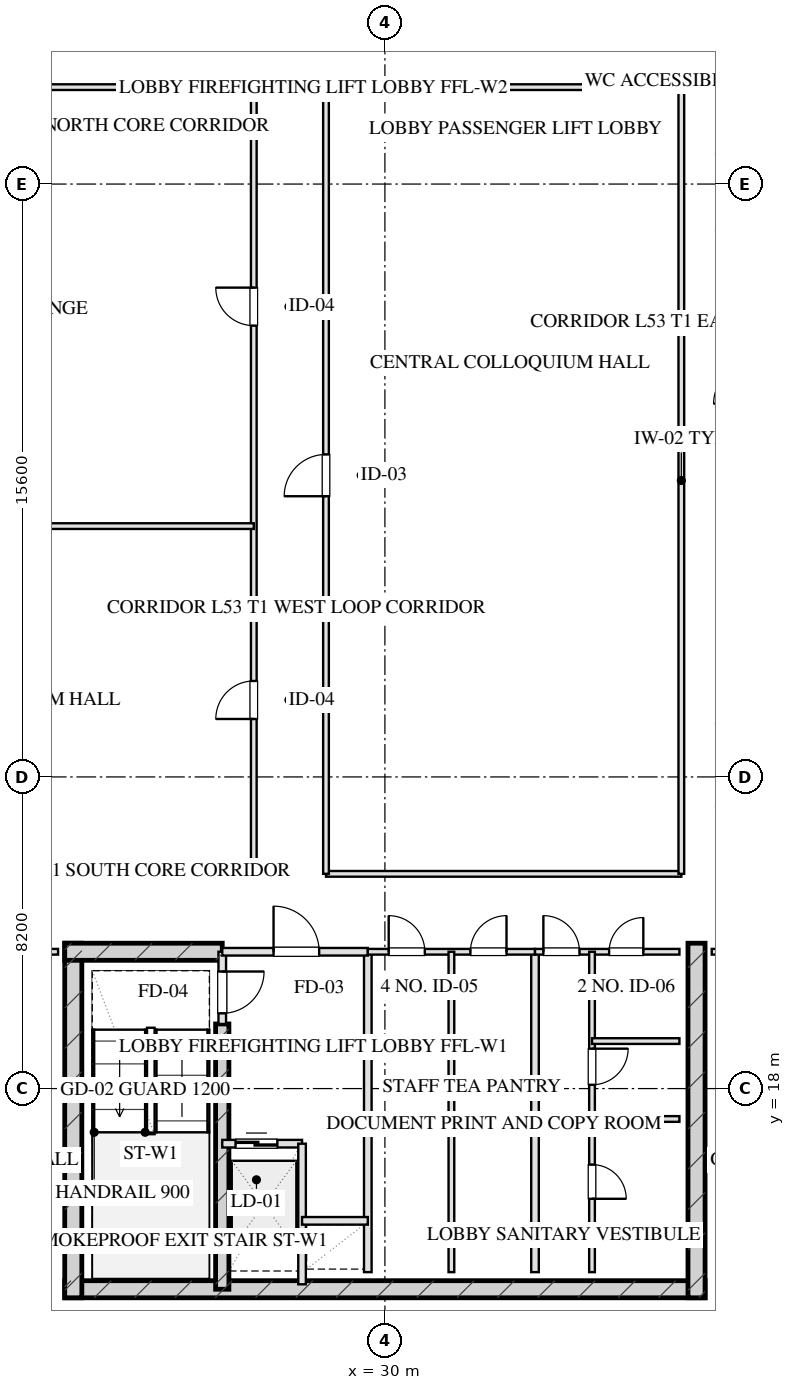
"""IFC4 building model, lengths in metres.
Left out: names, types, materials, properties, quantities, classifications, styles, units other than length and angle.
Written with IfcOpenShell. Run it as: python <this file> out.ifc"""

import sys

from ifc_helpers import new_model, si_unit, direction, frame, frame_2d, origin, place, context, subcontext, project, spatial, rectangle, extrude, element, fill, save


model = new_model("IFC4")
c1 = context("Model", 3, precision=1e-05, world=origin(), true_north=direction((0.0, 1.0)))
c2 = subcontext(c1, "Body", "Model", "MODEL_VIEW")
j1 = project(units=[si_unit("LENGTHUNIT", "METRE"), si_unit("PLANEANGLEUNIT", "RADIAN")], contexts=[c1])
p1 = place(None, origin())
s1 = spatial("IfcSite", under=j1, at=p1, CompositionType="ELEMENT")
p2 = place(p1, origin())
s2 = spatial("IfcBuilding", under=s1, at=p2, CompositionType="ELEMENT")
p3 = place(p2, frame((0.0, 0.0, 198.95)))
s3 = spatial("IfcBuildingStorey", under=s2, at=p3, CompositionType="ELEMENT", Elevation=198.95)
p4 = place(p3, frame((21.575, 12.72, 0.0), z_axis=(0.0, 0.0, 1.0), x_axis=(1.0, 0.0, 0.0)))
e1 = element("IfcWall", 1, at=p4, inside=s3, PredefinedType="SHEAR", context=c2, shape_type="SweptSolid", body=[
    extrude(rectangle(XDim=16.85, YDim=0.45, at=frame_2d((8.425, 0.0))), origin(), (0.0, 0.0, 1.0), 3.45),
])
for number, where, z_axis, x_axis in (
    (2, (21.8, 21.825, 0.0), (0.0, 0.0, 1.0), (0.0, -1.0, 0.0)),
    (3, (38.2, 21.825, 0.0), (0.0, 0.0, 1.0), (0.0, -1.0, 0.0)),
):
    element("IfcWall", number, at=place(p3, frame(where, z_axis=z_axis, x_axis=x_axis)), inside=s3, PredefinedType="SHEAR", context=c2, shape_type="SweptSolid", body=[
        extrude(rectangle(XDim=9.33, YDim=0.45, at=frame_2d((4.665, 0.0))), origin(), (0.0, 0.0, 1.0), 3.45),
    ])
p5 = place(p3, frame((25.72, 19.7, 0.0), z_axis=(0.0, 0.0, 1.0), x_axis=(0.0, -1.0, 0.0)))
e4 = element("IfcWall", 4, at=p5, inside=s3, PredefinedType="SHEAR", context=c2, shape_type="SweptSolid", body=[
    extrude(rectangle(XDim=6.98, YDim=0.35, at=frame_2d((3.49, 0.0))), origin(), (0.0, 0.0, 1.0), 3.45),
])
p6 = place(p3, frame((21.575, 21.6, 0.0), z_axis=(0.0, 0.0, 1.0), x_axis=(1.0, 0.0, 0.0)))
e5 = element("IfcWall", 5, at=p6, inside=s3, PredefinedType="SHEAR", context=c2, shape_type="SweptSolid", body=[
    extrude(rectangle(XDim=4.145, YDim=0.45, at=frame_2d((2.073, 0.0))), origin(), (0.0, 0.0, 1.0), 3.45),
])
p7 = place(p3, frame((25.72, 21.6, 0.0), z_axis=(0.0, 0.0, 1.0), x_axis=(0.0, -1.0, 0.0)))
e6 = element("IfcWall", 6, at=p7, inside=s3, PredefinedType="PARTITIONING", context=c2, shape_type="SweptSolid", body=[
    extrude(rectangle(XDim=1.9, YDim=0.2, at=frame_2d((0.95, 0.0))), origin(), (0.0, 0.0, 1.0), 3.175),
])
p8 = place(p7, frame((0.52, 0.0, 0.0)))
e7 = element("IfcOpeningElement", 7, at=p8, cuts=e6, PredefinedType="OPENING", context=c2, shape_type="SweptSolid", body=[
    extrude(rectangle(XDim=1.1, YDim=2.05, at=frame_2d((0.55, 1.025))), frame((0.0, 0.11, 0.0), z_axis=(0.0, -1.0, 0.0), x_axis=(1.0, 0.0, 0.0)), (0.0, 0.0, 1.0), 0.22),
])
p9 = place(p3, frame((29.55, 21.6, 0.0), z_axis=(0.0, 0.0, 1.0), x_axis=(0.0, -1.0, 0.0)))
e8 = element("IfcWall", 8, at=p9, inside=s3, PredefinedType="PARTITIONING", context=c2, shape_type="SweptSolid", body=[
    extrude(rectangle(XDim=8.43, YDim=0.2, at=frame_2d((4.215, 0.0))), origin(), (0.0, 0.0, 1.0), 3.175),
])
p10 = place(p3, frame((25.72, 21.6, 0.0), z_axis=(0.0, 0.0, 1.0), x_axis=(1.0, 0.0, 0.0)))
e9 = element("IfcWall", 9, at=p10, inside=s3, PredefinedType="PARTITIONING", context=c2, shape_type="SweptSolid", body=[
    extrude(rectangle(XDim=3.83, YDim=0.2, at=frame_2d((1.915, 0.0))), origin(), (0.0, 0.0, 1.0), 3.175),
])
p11 = place(p10, frame((1.35, 0.0, 0.0)))
e10 = element("IfcOpeningElement", 10, at=p11, cuts=e9, PredefinedType="OPENING", context=c2, shape_type="SweptSolid", body=[
    extrude(rectangle(XDim=1.2, YDim=2.05, at=frame_2d((0.6, 1.025))), frame((0.0, 0.11, 0.0), z_axis=(0.0, -1.0, 0.0), x_axis=(1.0, 0.0, 0.0)), (0.0, 0.0, 1.0), 0.22),
])
p12 = place(p3, frame((25.72, 16.55, 0.0), z_axis=(0.0, 0.0, 1.0), x_axis=(1.0, 0.0, 0.0)))
e11 = element("IfcWall", 11, at=p12, inside=s3, PredefinedType="PARTITIONING", context=c2, shape_type="SweptSolid", body=[
    extrude(rectangle(XDim=2.1, YDim=0.2, at=frame_2d((1.05, 0.0))), origin(), (0.0, 0.0, 1.0), 3.175),
])
p13 = place(p12, frame((0.35, 0.0, 0.0)))
e12 = element("IfcOpeningElement", 12, at=p13, cuts=e11, PredefinedType="OPENING", context=c2, shape_type="SweptSolid", body=[
    extrude(rectangle(XDim=1.1, YDim=2.05, at=frame_2d((0.55, 1.025))), frame((0.0, 0.11, 0.0), z_axis=(0.0, -1.0, 0.0), x_axis=(1.0, 0.0, 0.0)), (0.0, 0.0, 1.0), 0.22),
])
p14 = place(p3, frame((27.82, 16.55, 0.0), z_axis=(0.0, 0.0, 1.0), x_axis=(0.0, -1.0, 0.0)))
e13 = element("IfcWall", 13, at=p14, inside=s3, PredefinedType="PARTITIONING", context=c2, shape_type="SweptSolid", body=[
    extrude(rectangle(XDim=3.7, YDim=0.2, at=frame_2d((1.85, 0.0))), origin(), (0.0, 0.0, 1.0), 3.175),
])
p15 = place(p3, frame((27.82, 14.52, 0.0), z_axis=(0.0, 0.0, 1.0), x_axis=(1.0, 0.0, 0.0)))
e14 = element("IfcWall", 14, at=p15, inside=s3, PredefinedType="PARTITIONING", context=c2, shape_type="SweptSolid", body=[
    extrude(rectangle(XDim=1.73, YDim=0.2, at=frame_2d((0.865, 0.0))), origin(), (0.0, 0.0, 1.0), 3.175),
])
p16 = place(p3, frame((33.95, 21.6, 0.0), z_axis=(0.0, 0.0, 1.0), x_axis=(0.0, -1.0, 0.0)))
e15 = element("IfcWall", 15, at=p16, inside=s3, PredefinedType="PARTITIONING", context=c2, shape_type="SweptSolid", body=[
    extrude(rectangle(XDim=8.43, YDim=0.2, at=frame_2d((4.215, 0.0))), origin(), (0.0, 0.0, 1.0), 3.175),
])
p17 = place(p3, frame((29.55, 21.6, 0.0), z_axis=(0.0, 0.0, 1.0), x_axis=(1.0, 0.0, 0.0)))
e16 = element("IfcWall", 16, at=p17, inside=s3, PredefinedType="PARTITIONING", context=c2, shape_type="SweptSolid", body=[
    extrude(rectangle(XDim=4.4, YDim=0.15, at=frame_2d((2.2, 0.0))), origin(), (0.0, 0.0, 1.0), 3.175),
])
p18 = place(p17, frame((0.55, 0.0, 0.0)))
e17 = element("IfcOpeningElement", 17, at=p18, cuts=e16, PredefinedType="OPENING", context=c2, shape_type="SweptSolid", body=[
    extrude(rectangle(XDim=0.95, YDim=2.05, at=frame_2d((0.475, 1.025))), frame((0.0, 0.085, 0.0), z_axis=(0.0, -1.0, 0.0), x_axis=(1.0, 0.0, 0.0)), (0.0, 0.0, 1.0), 0.17),
])
p19 = place(p17, frame((2.7, 0.0, 0.0)))
e18 = element("IfcOpeningElement", 18, at=p19, cuts=e16, PredefinedType="OPENING", context=c2, shape_type="SweptSolid", body=[
    extrude(rectangle(XDim=0.95, YDim=2.05, at=frame_2d((0.475, 1.025))), frame((0.0, 0.085, 0.0), z_axis=(0.0, -1.0, 0.0), x_axis=(1.0, 0.0, 0.0)), (0.0, 0.0, 1.0), 0.17),
])
p20 = place(p3, frame((31.75, 21.6, 0.0), z_axis=(0.0, 0.0, 1.0), x_axis=(0.0, -1.0, 0.0)))
e19 = element("IfcWall", 19, at=p20, inside=s3, PredefinedType="PARTITIONING", context=c2, shape_type="SweptSolid", body=[
    extrude(rectangle(XDim=8.43, YDim=0.15, at=frame_2d((4.215, 0.0))), origin(), (0.0, 0.0, 1.0), 3.175),
])
p21 = place(p3, frame((33.95, 21.6, 0.0), z_axis=(0.0, 0.0, 1.0), x_axis=(1.0, 0.0, 0.0)))
e20 = element("IfcWall", 20, at=p21, inside=s3, PredefinedType="PARTITIONING", context=c2, shape_type="SweptSolid", body=[
    extrude(rectangle(XDim=3.8, YDim=0.15, at=frame_2d((1.9, 0.0))), origin(), (0.0, 0.0, 1.0), 3.175),
])
p22 = place(p21, frame((0.22, 0.0, 0.0)))
e21 = element("IfcOpeningElement", 21, at=p22, cuts=e20, PredefinedType="OPENING", context=c2, shape_type="SweptSolid", body=[
    extrude(rectangle(XDim=0.95, YDim=2.05, at=frame_2d((0.475, 1.025))), frame((0.0, 0.085, 0.0), z_axis=(0.0, -1.0, 0.0), x_axis=(1.0, 0.0, 0.0)), (0.0, 0.0, 1.0), 0.17),
])
p23 = place(p21, frame((1.95, 0.0, 0.0)))
e22 = element("IfcOpeningElement", 22, at=p23, cuts=e20, PredefinedType="OPENING", context=c2, shape_type="SweptSolid", body=[
    extrude(rectangle(XDim=0.9, YDim=2.05, at=frame_2d((0.45, 1.025))), frame((0.0, 0.085, 0.0), z_axis=(0.0, -1.0, 0.0), x_axis=(1.0, 0.0, 0.0)), (0.0, 0.0, 1.0), 0.17),
])
p24 = place(p3, frame((35.45, 21.6, 0.0), z_axis=(0.0, 0.0, 1.0), x_axis=(0.0, -1.0, 0.0)))
e23 = element("IfcWall", 23, at=p24, inside=s3, PredefinedType="PARTITIONING", context=c2, shape_type="SweptSolid", body=[
    extrude(rectangle(XDim=8.43, YDim=0.15, at=frame_2d((4.215, 0.0))), origin(), (0.0, 0.0, 1.0), 2.815),
])
p25 = place(p24, frame((2.55, 0.0, 0.0)))
e24 = element("IfcOpeningElement", 24, at=p25, cuts=e23, PredefinedType="OPENING", context=c2, shape_type="SweptSolid", body=[
    extrude(rectangle(XDim=0.95, YDim=2.05, at=frame_2d((0.475, 1.025))), frame((0.0, 0.085, 0.0), z_axis=(0.0, -1.0, 0.0), x_axis=(1.0, 0.0, 0.0)), (0.0, 0.0, 1.0), 0.17),
])
p26 = place(p24, frame((5.6, 0.0, 0.0)))
e25 = element("IfcOpeningElement", 25, at=p26, cuts=e23, PredefinedType="OPENING", context=c2, shape_type="SweptSolid", body=[
    extrude(rectangle(XDim=0.9, YDim=2.05, at=frame_2d((0.45, 1.025))), frame((0.0, 0.085, 0.0), z_axis=(0.0, -1.0, 0.0), x_axis=(1.0, 0.0, 0.0)), (0.0, 0.0, 1.0), 0.17),
])
for number, where, z_axis, x_axis in (
    (26, (35.45, 17.2, 0.0), (0.0, 0.0, 1.0), (1.0, 0.0, 0.0)),
    (27, (35.45, 19.25, 0.0), (0.0, 0.0, 1.0), (1.0, 0.0, 0.0)),
):
    element("IfcWall", number, at=place(p3, frame(where, z_axis=z_axis, x_axis=x_axis)), inside=s3, PredefinedType="PARTITIONING", context=c2, shape_type="SweptSolid", body=[
        extrude(rectangle(XDim=2.3, YDim=0.15, at=frame_2d((1.15, 0.0))), origin(), (0.0, 0.0, 1.0), 3.175),
    ])
p27 = place(p3, frame((13.2, 21.6, 0.0), z_axis=(0.0, 0.0, 1.0), x_axis=(1.0, 0.0, 0.0)))
e28 = element("IfcWall", 28, at=p27, inside=s3, PredefinedType="PARTITIONING", context=c2, shape_type="SweptSolid", body=[
    extrude(rectangle(XDim=8.2, YDim=0.15, at=frame_2d((4.1, 0.0))), origin(), (0.0, 0.0, 1.0), 3.175),
])
p28 = place(p27, frame((3.444, 0.0, 0.0)))
e29 = element("IfcOpeningElement", 29, at=p28, cuts=e28, PredefinedType="OPENING", context=c2, shape_type="SweptSolid", body=[
    extrude(rectangle(XDim=1.0, YDim=2.05, at=frame_2d((0.5, 1.025))), frame((0.0, 0.085, 0.0), z_axis=(0.0, -1.0, 0.0), x_axis=(1.0, 0.0, 0.0)), (0.0, 0.0, 1.0), 0.17),
])
p29 = place(p3, frame((38.6, 21.6, 0.0), z_axis=(0.0, 0.0, 1.0), x_axis=(1.0, 0.0, 0.0)))
e30 = element("IfcWall", 30, at=p29, inside=s3, PredefinedType="PARTITIONING", context=c2, shape_type="SweptSolid", body=[
    extrude(rectangle(XDim=8.2, YDim=0.15, at=frame_2d((4.1, 0.0))), origin(), (0.0, 0.0, 1.0), 3.175),
])
p30 = place(p29, frame((3.444, 0.0, 0.0)))
e31 = element("IfcOpeningElement", 31, at=p30, cuts=e30, PredefinedType="OPENING", context=c2, shape_type="SweptSolid", body=[
    extrude(rectangle(XDim=1.0, YDim=2.05, at=frame_2d((0.5, 1.025))), frame((0.0, 0.085, 0.0), z_axis=(0.0, -1.0, 0.0), x_axis=(1.0, 0.0, 0.0)), (0.0, 0.0, 1.0), 0.17),
])
p31 = place(p3, frame((13.2, 23.65, 0.0), z_axis=(0.0, 0.0, 1.0), x_axis=(1.0, 0.0, 0.0)))
e32 = element("IfcWall", 32, at=p31, inside=s3, PredefinedType="PARTITIONING", context=c2, shape_type="SweptSolid", body=[
    extrude(rectangle(XDim=13.35, YDim=0.15, at=frame_2d((6.675, 0.0))), origin(), (0.0, 0.0, 1.0), 3.175),
])
p32 = place(p3, frame((28.45, 23.65, 0.0), z_axis=(0.0, 0.0, 1.0), x_axis=(1.0, 0.0, 0.0)))
e33 = element("IfcWall", 33, at=p32, inside=s3, PredefinedType="PARTITIONING", context=c2, shape_type="SweptSolid", body=[
    extrude(rectangle(XDim=9.35, YDim=0.15, at=frame_2d((4.675, 0.0))), origin(), (0.0, 0.0, 1.0), 3.175),
])
p33 = place(p3, frame((13.2, 44.35, 0.0), z_axis=(0.0, 0.0, 1.0), x_axis=(1.0, 0.0, 0.0)))
e34 = element("IfcWall", 34, at=p33, inside=s3, PredefinedType="PARTITIONING", context=c2, shape_type="SweptSolid", body=[
    extrude(rectangle(XDim=13.35, YDim=0.15, at=frame_2d((6.675, 0.0))), origin(), (0.0, 0.0, 1.0), 3.175),
])
p34 = place(p3, frame((28.45, 44.35, 0.0), z_axis=(0.0, 0.0, 1.0), x_axis=(1.0, 0.0, 0.0)))
e35 = element("IfcWall", 35, at=p34, inside=s3, PredefinedType="PARTITIONING", context=c2, shape_type="SweptSolid", body=[
    extrude(rectangle(XDim=9.35, YDim=0.15, at=frame_2d((4.675, 0.0))), origin(), (0.0, 0.0, 1.0), 3.175),
])
p35 = place(p3, frame((26.55, 23.65, 0.0), z_axis=(0.0, 0.0, 1.0), x_axis=(0.0, 1.0, 0.0)))
e36 = element("IfcWall", 36, at=p35, inside=s3, PredefinedType="PARTITIONING", context=c2, shape_type="SweptSolid", body=[
    extrude(rectangle(XDim=20.7, YDim=0.15, at=frame_2d((10.35, 0.0))), origin(), (0.0, 0.0, 1.0), 3.175),
])
p36 = place(p35, frame((4.075, 0.0, 0.0)))
e37 = element("IfcOpeningElement", 37, at=p36, cuts=e36, PredefinedType="OPENING", context=c2, shape_type="SweptSolid", body=[
    extrude(rectangle(XDim=1.0, YDim=2.05, at=frame_2d((0.5, 1.025))), frame((0.0, 0.085, 0.0), z_axis=(0.0, -1.0, 0.0), x_axis=(1.0, 0.0, 0.0)), (0.0, 0.0, 1.0), 0.17),
])
p37 = place(p35, frame((14.425, 0.0, 0.0)))
e38 = element("IfcOpeningElement", 38, at=p37, cuts=e36, PredefinedType="OPENING", context=c2, shape_type="SweptSolid", body=[
    extrude(rectangle(XDim=1.0, YDim=2.05, at=frame_2d((0.5, 1.025))), frame((0.0, 0.085, 0.0), z_axis=(0.0, -1.0, 0.0), x_axis=(1.0, 0.0, 0.0)), (0.0, 0.0, 1.0), 0.17),
])
p38 = place(p3, frame((28.45, 23.65, 0.0), z_axis=(0.0, 0.0, 1.0), x_axis=(0.0, 1.0, 0.0)))
e39 = element("IfcWall", 39, at=p38, inside=s3, PredefinedType="PARTITIONING", context=c2, shape_type="SweptSolid", body=[
    extrude(rectangle(XDim=20.7, YDim=0.15, at=frame_2d((10.35, 0.0))), origin(), (0.0, 0.0, 1.0), 3.175),
])
p39 = place(p38, frame((9.936, 0.0, 0.0)))
e40 = element("IfcOpeningElement", 40, at=p39, cuts=e39, PredefinedType="OPENING", context=c2, shape_type="SweptSolid", body=[
    extrude(rectangle(XDim=1.1, YDim=2.05, at=frame_2d((0.55, 1.025))), frame((0.0, 0.085, 0.0), z_axis=(0.0, -1.0, 0.0), x_axis=(1.0, 0.0, 0.0)), (0.0, 0.0, 1.0), 0.17),
])
p40 = place(p3, frame((37.8, 23.65, 0.0), z_axis=(0.0, 0.0, 1.0), x_axis=(0.0, 1.0, 0.0)))
e41 = element("IfcWall", 41, at=p40, inside=s3, PredefinedType="PARTITIONING", context=c2, shape_type="SweptSolid", body=[
    extrude(rectangle(XDim=20.7, YDim=0.15, at=frame_2d((10.35, 0.0))), origin(), (0.0, 0.0, 1.0), 3.175),
])
p41 = place(p3, frame((13.2, 32.8, 0.0), z_axis=(0.0, 0.0, 1.0), x_axis=(1.0, 0.0, 0.0)))
e42 = element("IfcWall", 42, at=p41, inside=s3, PredefinedType="PARTITIONING", context=c2, shape_type="SweptSolid", body=[
    extrude(rectangle(XDim=13.35, YDim=0.15, at=frame_2d((6.675, 0.0))), origin(), (0.0, 0.0, 1.0), 3.175),
])
p42 = place(p8, origin())
e43 = element("IfcDoor", 43, at=p42, inside=s3, OperationType="SINGLE_SWING_LEFT", PredefinedType="DOOR", context=c2, shape_type="SweptSolid", body=[
    extrude(rectangle(XDim=1.1, YDim=2.05, at=frame_2d((0.55, 1.025))), frame((0.0, 0.025, 0.0), z_axis=(0.0, -1.0, 0.0), x_axis=(1.0, 0.0, 0.0)), (0.0, 0.0, 1.0), 0.05),
])
fill(e7, e43)
p43 = place(p11, origin())
e44 = element("IfcDoor", 44, at=p43, inside=s3, OperationType="SINGLE_SWING_LEFT", PredefinedType="DOOR", context=c2, shape_type="SweptSolid", body=[
    extrude(rectangle(XDim=1.2, YDim=2.05, at=frame_2d((0.6, 1.025))), frame((0.0, 0.025, 0.0), z_axis=(0.0, -1.0, 0.0), x_axis=(1.0, 0.0, 0.0)), (0.0, 0.0, 1.0), 0.05),
])
fill(e10, e44)
p44 = place(p13, origin())
e45 = element("IfcDoor", 45, at=p44, inside=s3, OperationType="DOUBLE_DOOR_SLIDING", PredefinedType="DOOR", context=c2, shape_type="SweptSolid", body=[
    extrude(rectangle(XDim=1.1, YDim=2.05, at=frame_2d((0.55, 1.025))), frame((0.0, 0.025, 0.0), z_axis=(0.0, -1.0, 0.0), x_axis=(1.0, 0.0, 0.0)), (0.0, 0.0, 1.0), 0.05),
])
fill(e12, e45)
p45 = place(p18, origin())
e46 = element("IfcDoor", 46, at=p45, inside=s3, OperationType="SINGLE_SWING_LEFT", PredefinedType="DOOR", context=c2, shape_type="SweptSolid", body=[
    extrude(rectangle(XDim=0.95, YDim=2.05, at=frame_2d((0.475, 1.025))), frame((0.0, 0.025, 0.0), z_axis=(0.0, -1.0, 0.0), x_axis=(1.0, 0.0, 0.0)), (0.0, 0.0, 1.0), 0.05),
])
fill(e17, e46)
p46 = place(p19, origin())
e47 = element("IfcDoor", 47, at=p46, inside=s3, OperationType="SINGLE_SWING_RIGHT", PredefinedType="DOOR", context=c2, shape_type="SweptSolid", body=[
    extrude(rectangle(XDim=0.95, YDim=2.05, at=frame_2d((0.475, 1.025))), frame((0.0, 0.025, 0.0), z_axis=(0.0, -1.0, 0.0), x_axis=(1.0, 0.0, 0.0)), (0.0, 0.0, 1.0), 0.05),
])
fill(e18, e47)
p47 = place(p22, origin())
e48 = element("IfcDoor", 48, at=p47, inside=s3, OperationType="SINGLE_SWING_LEFT", PredefinedType="DOOR", context=c2, shape_type="SweptSolid", body=[
    extrude(rectangle(XDim=0.95, YDim=2.05, at=frame_2d((0.475, 1.025))), frame((0.0, 0.025, 0.0), z_axis=(0.0, -1.0, 0.0), x_axis=(1.0, 0.0, 0.0)), (0.0, 0.0, 1.0), 0.05),
])
fill(e21, e48)
p48 = place(p23, origin())
e49 = element("IfcDoor", 49, at=p48, inside=s3, OperationType="SINGLE_SWING_RIGHT", PredefinedType="DOOR", context=c2, shape_type="SweptSolid", body=[
    extrude(rectangle(XDim=0.9, YDim=2.05, at=frame_2d((0.45, 1.025))), frame((0.0, 0.025, 0.0), z_axis=(0.0, -1.0, 0.0), x_axis=(1.0, 0.0, 0.0)), (0.0, 0.0, 1.0), 0.05),
])
fill(e22, e49)
p49 = place(p25, origin())
e50 = element("IfcDoor", 50, at=p49, inside=s3, OperationType="SINGLE_SWING_LEFT", PredefinedType="DOOR", context=c2, shape_type="SweptSolid", body=[
    extrude(rectangle(XDim=0.95, YDim=2.05, at=frame_2d((0.475, 1.025))), frame((0.0, 0.025, 0.0), z_axis=(0.0, -1.0, 0.0), x_axis=(1.0, 0.0, 0.0)), (0.0, 0.0, 1.0), 0.05),
])
fill(e24, e50)
p50 = place(p26, origin())
e51 = element("IfcDoor", 51, at=p50, inside=s3, OperationType="SINGLE_SWING_RIGHT", PredefinedType="DOOR", context=c2, shape_type="SweptSolid", body=[
    extrude(rectangle(XDim=0.9, YDim=2.05, at=frame_2d((0.45, 1.025))), frame((0.0, 0.025, 0.0), z_axis=(0.0, -1.0, 0.0), x_axis=(1.0, 0.0, 0.0)), (0.0, 0.0, 1.0), 0.05),
])
fill(e25, e51)
p51 = place(p36, origin())
e52 = element("IfcDoor", 52, at=p51, inside=s3, OperationType="SINGLE_SWING_LEFT", PredefinedType="DOOR", context=c2, shape_type="SweptSolid", body=[
    extrude(rectangle(XDim=1.0, YDim=2.05, at=frame_2d((0.5, 1.025))), frame((0.0, 0.025, 0.0), z_axis=(0.0, -1.0, 0.0), x_axis=(1.0, 0.0, 0.0)), (0.0, 0.0, 1.0), 0.05),
])
fill(e37, e52)
p52 = place(p37, origin())
e53 = element("IfcDoor", 53, at=p52, inside=s3, OperationType="SINGLE_SWING_RIGHT", PredefinedType="DOOR", context=c2, shape_type="SweptSolid", body=[
    extrude(rectangle(XDim=1.0, YDim=2.05, at=frame_2d((0.5, 1.025))), frame((0.0, 0.025, 0.0), z_axis=(0.0, -1.0, 0.0), x_axis=(1.0, 0.0, 0.0)), (0.0, 0.0, 1.0), 0.05),
])
fill(e38, e53)
p53 = place(p39, origin())
e54 = element("IfcDoor", 54, at=p53, inside=s3, OperationType="SINGLE_SWING_LEFT", PredefinedType="DOOR", context=c2, shape_type="SweptSolid", body=[
    extrude(rectangle(XDim=1.1, YDim=2.05, at=frame_2d((0.55, 1.025))), frame((0.0, 0.025, 0.0), z_axis=(0.0, -1.0, 0.0), x_axis=(1.0, 0.0, 0.0)), (0.0, 0.0, 1.0), 0.05),
])
fill(e40, e54)
save(model, sys.argv[1])
